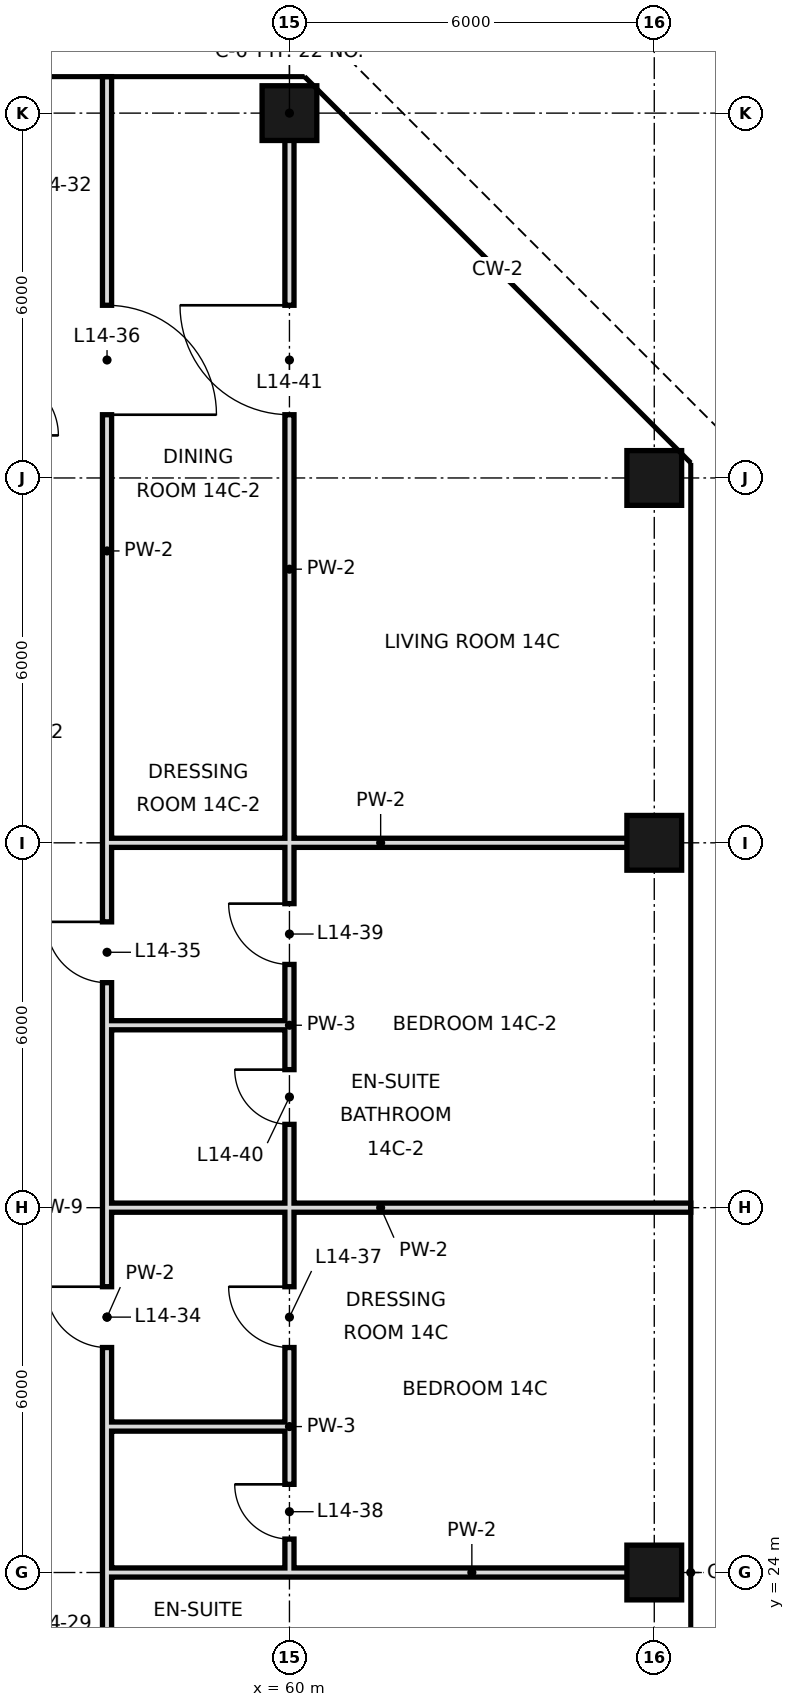
"""IFC4 building model, lengths in metres.
Left out: names, types, materials, properties, quantities, classifications, styles, units other than length and angle.
Written with IfcOpenShell. Run it as: python <this file> out.ifc"""

import sys

from ifc_helpers import new_model, si_unit, direction, frame, frame_2d, origin, origin_2d, place, context, subcontext, project, spatial, rectangle, hollow_rectangle, extrude, element, fill, save


model = new_model("IFC4")
c1 = context("Model", 3, precision=1e-05, world=origin(), true_north=direction((0.0, 1.0)))
c2 = subcontext(c1, "Body", "Model", "MODEL_VIEW")
j1 = project(units=[si_unit("LENGTHUNIT", "METRE"), si_unit("PLANEANGLEUNIT", "RADIAN")], contexts=[c1])
p1 = place(None, origin())
s1 = spatial("IfcSite", under=j1, at=p1, CompositionType="ELEMENT")
p2 = place(p1, origin())
s2 = spatial("IfcBuilding", under=s1, at=p2, CompositionType="ELEMENT")
p3 = place(p2, frame((0.0, 0.0, 71.4)))
s3 = spatial("IfcBuildingStorey", under=s2, at=p3, CompositionType="ELEMENT", Elevation=71.4)
for number, where, z_axis, x_axis in (
    (1, (60.0, 48.0, 0.0), (0.0, 0.0, 1.0), (1.0, 0.0, 0.0)),
    (2, (66.0, 24.0, 0.0), (0.0, 0.0, 1.0), (1.0, 0.0, 0.0)),
    (3, (66.0, 36.0, 0.0), (0.0, 0.0, 1.0), (1.0, 0.0, 0.0)),
    (4, (66.0, 42.0, 0.0), (0.0, 0.0, 1.0), (1.0, 0.0, 0.0)),
):
    element("IfcColumn", number, at=place(p3, frame(where, z_axis=z_axis, x_axis=x_axis)), inside=s3, PredefinedType="COLUMN", context=c2, shape_type="SweptSolid", body=[
        extrude(hollow_rectangle(XDim=0.9, YDim=0.9, WallThickness=0.045, at=origin_2d()), origin(), (0.0, 0.0, 1.0), 3.6),
    ])
p4 = place(p3, frame((57.0, 18.0, 0.0), z_axis=(0.0, 0.0, 1.0), x_axis=(0.0, 1.0, 0.0)))
e5 = element("IfcWall", 5, at=p4, inside=s3, PredefinedType="PARTITIONING", context=c2, shape_type="SweptSolid", body=[
    extrude(rectangle(XDim=6.0, YDim=0.15, at=frame_2d((3.0, 0.0))), origin(), (0.0, 0.0, 1.0), 3.42),
])
p5 = place(p4, frame((2.1, 0.0, 0.0)))
e6 = element("IfcOpeningElement", 6, at=p5, cuts=e5, PredefinedType="OPENING", context=c2, shape_type="SweptSolid", body=[
    extrude(rectangle(XDim=1.8, YDim=2.4, at=frame_2d((0.9, 1.2))), frame((0.0, 0.085, 0.0), z_axis=(0.0, -1.0, 0.0), x_axis=(1.0, 0.0, 0.0)), (0.0, 0.0, 1.0), 0.17),
])
p6 = place(p3, frame((57.0, 26.4, 0.0), z_axis=(0.0, 0.0, 1.0), x_axis=(0.0, 1.0, 0.0)))
e7 = element("IfcWall", 7, at=p6, inside=s3, PredefinedType="PARTITIONING", context=c2, shape_type="SweptSolid", body=[
    extrude(rectangle(XDim=3.6, YDim=0.15, at=frame_2d((1.8, 0.0))), origin(), (0.0, 0.0, 1.0), 3.42),
])
p7 = place(p6, frame((1.3, 0.0, 0.0)))
e8 = element("IfcOpeningElement", 8, at=p7, cuts=e7, PredefinedType="OPENING", context=c2, shape_type="SweptSolid", body=[
    extrude(rectangle(XDim=1.0, YDim=2.4, at=frame_2d((0.5, 1.2))), frame((0.0, 0.085, 0.0), z_axis=(0.0, -1.0, 0.0), x_axis=(1.0, 0.0, 0.0)), (0.0, 0.0, 1.0), 0.17),
])
p8 = place(p3, frame((57.0, 33.0, 0.0), z_axis=(0.0, 0.0, 1.0), x_axis=(0.0, 1.0, 0.0)))
e9 = element("IfcWall", 9, at=p8, inside=s3, PredefinedType="PARTITIONING", context=c2, shape_type="SweptSolid", body=[
    extrude(rectangle(XDim=15.6, YDim=0.15, at=frame_2d((7.8, 0.0))), origin(), (0.0, 0.0, 1.0), 3.42),
])
p9 = place(p8, frame((0.7, 0.0, 0.0)))
e10 = element("IfcOpeningElement", 10, at=p9, cuts=e9, PredefinedType="OPENING", context=c2, shape_type="SweptSolid", body=[
    extrude(rectangle(XDim=1.0, YDim=2.4, at=frame_2d((0.5, 1.2))), frame((0.0, 0.085, 0.0), z_axis=(0.0, -1.0, 0.0), x_axis=(1.0, 0.0, 0.0)), (0.0, 0.0, 1.0), 0.17),
])
p10 = place(p8, frame((10.04, 0.0, 0.0)))
e11 = element("IfcOpeningElement", 11, at=p10, cuts=e9, PredefinedType="OPENING", context=c2, shape_type="SweptSolid", body=[
    extrude(rectangle(XDim=1.8, YDim=2.4, at=frame_2d((0.9, 1.2))), frame((0.0, 0.085, 0.0), z_axis=(0.0, -1.0, 0.0), x_axis=(1.0, 0.0, 0.0)), (0.0, 0.0, 1.0), 0.17),
])
p11 = place(p3, frame((57.0, 24.0, 0.0), z_axis=(0.0, 0.0, 1.0), x_axis=(0.0, 1.0, 0.0)))
e12 = element("IfcWall", 12, at=p11, inside=s3, PredefinedType="PARTITIONING", context=c2, shape_type="SweptSolid", body=[
    extrude(rectangle(XDim=2.4, YDim=0.15, at=frame_2d((1.2, 0.0))), origin(), (0.0, 0.0, 1.0), 3.42),
])
p12 = place(p3, frame((57.0, 30.0, 0.0), z_axis=(0.0, 0.0, 1.0), x_axis=(0.0, 1.0, 0.0)))
e13 = element("IfcWall", 13, at=p12, inside=s3, PredefinedType="PARTITIONING", context=c2, shape_type="SweptSolid", body=[
    extrude(rectangle(XDim=3.0, YDim=0.15, at=frame_2d((1.5, 0.0))), origin(), (0.0, 0.0, 1.0), 3.42),
])
p13 = place(p3, frame((60.0, 26.4, 0.0), z_axis=(0.0, 0.0, 1.0), x_axis=(0.0, 1.0, 0.0)))
e14 = element("IfcWall", 14, at=p13, inside=s3, PredefinedType="PARTITIONING", context=c2, shape_type="SweptSolid", body=[
    extrude(rectangle(XDim=3.6, YDim=0.15, at=frame_2d((1.8, 0.0))), origin(), (0.0, 0.0, 1.0), 3.42),
])
p14 = place(p13, frame((1.3, 0.0, 0.0)))
e15 = element("IfcOpeningElement", 15, at=p14, cuts=e14, PredefinedType="OPENING", context=c2, shape_type="SweptSolid", body=[
    extrude(rectangle(XDim=1.0, YDim=2.4, at=frame_2d((0.5, 1.2))), frame((0.0, 0.085, 0.0), z_axis=(0.0, -1.0, 0.0), x_axis=(1.0, 0.0, 0.0)), (0.0, 0.0, 1.0), 0.17),
])
p15 = place(p3, frame((60.0, 33.0, 0.0), z_axis=(0.0, 0.0, 1.0), x_axis=(0.0, 1.0, 0.0)))
e16 = element("IfcWall", 16, at=p15, inside=s3, PredefinedType="PARTITIONING", context=c2, shape_type="SweptSolid", body=[
    extrude(rectangle(XDim=15.0, YDim=0.15, at=frame_2d((7.5, 0.0))), origin(), (0.0, 0.0, 1.0), 3.42),
])
p16 = place(p15, frame((1.0, 0.0, 0.0)))
e17 = element("IfcOpeningElement", 17, at=p16, cuts=e16, PredefinedType="OPENING", context=c2, shape_type="SweptSolid", body=[
    extrude(rectangle(XDim=1.0, YDim=2.4, at=frame_2d((0.5, 1.2))), frame((0.0, 0.085, 0.0), z_axis=(0.0, -1.0, 0.0), x_axis=(1.0, 0.0, 0.0)), (0.0, 0.0, 1.0), 0.17),
])
p17 = place(p15, frame((10.04, 0.0, 0.0)))
e18 = element("IfcOpeningElement", 18, at=p17, cuts=e16, PredefinedType="OPENING", context=c2, shape_type="SweptSolid", body=[
    extrude(rectangle(XDim=1.8, YDim=2.4, at=frame_2d((0.9, 1.2))), frame((0.0, 0.085, 0.0), z_axis=(0.0, -1.0, 0.0), x_axis=(1.0, 0.0, 0.0)), (0.0, 0.0, 1.0), 0.17),
])
p18 = place(p3, frame((60.0, 24.0, 0.0), z_axis=(0.0, 0.0, 1.0), x_axis=(0.0, 1.0, 0.0)))
e19 = element("IfcWall", 19, at=p18, inside=s3, PredefinedType="PARTITIONING", context=c2, shape_type="SweptSolid", body=[
    extrude(rectangle(XDim=2.4, YDim=0.15, at=frame_2d((1.2, 0.0))), origin(), (0.0, 0.0, 1.0), 3.42),
])
p19 = place(p18, frame((0.55, 0.0, 0.0)))
e20 = element("IfcOpeningElement", 20, at=p19, cuts=e19, PredefinedType="OPENING", context=c2, shape_type="SweptSolid", body=[
    extrude(rectangle(XDim=0.9, YDim=2.4, at=frame_2d((0.45, 1.2))), frame((0.0, 0.085, 0.0), z_axis=(0.0, -1.0, 0.0), x_axis=(1.0, 0.0, 0.0)), (0.0, 0.0, 1.0), 0.17),
])
p20 = place(p3, frame((60.0, 30.0, 0.0), z_axis=(0.0, 0.0, 1.0), x_axis=(0.0, 1.0, 0.0)))
e21 = element("IfcWall", 21, at=p20, inside=s3, PredefinedType="PARTITIONING", context=c2, shape_type="SweptSolid", body=[
    extrude(rectangle(XDim=3.0, YDim=0.15, at=frame_2d((1.5, 0.0))), origin(), (0.0, 0.0, 1.0), 3.42),
])
p21 = place(p20, frame((1.37, 0.0, 0.0)))
e22 = element("IfcOpeningElement", 22, at=p21, cuts=e21, PredefinedType="OPENING", context=c2, shape_type="SweptSolid", body=[
    extrude(rectangle(XDim=0.9, YDim=2.4, at=frame_2d((0.45, 1.2))), frame((0.0, 0.085, 0.0), z_axis=(0.0, -1.0, 0.0), x_axis=(1.0, 0.0, 0.0)), (0.0, 0.0, 1.0), 0.17),
])
p22 = place(p3, frame((60.0, 24.0, 0.0), z_axis=(0.0, 0.0, 1.0), x_axis=(1.0, 0.0, 0.0)))
e23 = element("IfcWall", 23, at=p22, inside=s3, PredefinedType="PARTITIONING", context=c2, shape_type="SweptSolid", body=[
    extrude(rectangle(XDim=6.0, YDim=0.15, at=frame_2d((3.0, 0.0))), origin(), (0.0, 0.0, 1.0), 2.52),
])
p23 = place(p3, frame((57.0, 24.0, 0.0), z_axis=(0.0, 0.0, 1.0), x_axis=(1.0, 0.0, 0.0)))
e24 = element("IfcWall", 24, at=p23, inside=s3, PredefinedType="PARTITIONING", context=c2, shape_type="SweptSolid", body=[
    extrude(rectangle(XDim=3.0, YDim=0.15, at=frame_2d((1.5, 0.0))), origin(), (0.0, 0.0, 1.0), 2.52),
])
p24 = place(p3, frame((57.0, 26.4, 0.0), z_axis=(0.0, 0.0, 1.0), x_axis=(1.0, 0.0, 0.0)))
e25 = element("IfcWall", 25, at=p24, inside=s3, PredefinedType="PARTITIONING", context=c2, shape_type="SweptSolid", body=[
    extrude(rectangle(XDim=3.0, YDim=0.15, at=frame_2d((1.5, 0.0))), origin(), (0.0, 0.0, 1.0), 3.42),
])
p25 = place(p3, frame((60.0, 30.0, 0.0), z_axis=(0.0, 0.0, 1.0), x_axis=(1.0, 0.0, 0.0)))
e26 = element("IfcWall", 26, at=p25, inside=s3, PredefinedType="PARTITIONING", context=c2, shape_type="SweptSolid", body=[
    extrude(rectangle(XDim=6.6, YDim=0.15, at=frame_2d((3.3, 0.0))), origin(), (0.0, 0.0, 1.0), 2.52),
])
p26 = place(p3, frame((57.0, 30.0, 0.0), z_axis=(0.0, 0.0, 1.0), x_axis=(1.0, 0.0, 0.0)))
e27 = element("IfcWall", 27, at=p26, inside=s3, PredefinedType="PARTITIONING", context=c2, shape_type="SweptSolid", body=[
    extrude(rectangle(XDim=3.0, YDim=0.15, at=frame_2d((1.5, 0.0))), origin(), (0.0, 0.0, 1.0), 2.52),
])
p27 = place(p3, frame((57.0, 33.0, 0.0), z_axis=(0.0, 0.0, 1.0), x_axis=(1.0, 0.0, 0.0)))
e28 = element("IfcWall", 28, at=p27, inside=s3, PredefinedType="PARTITIONING", context=c2, shape_type="SweptSolid", body=[
    extrude(rectangle(XDim=3.0, YDim=0.15, at=frame_2d((1.5, 0.0))), origin(), (0.0, 0.0, 1.0), 3.42),
])
p28 = place(p3, frame((57.0, 36.0, 0.0), z_axis=(0.0, 0.0, 1.0), x_axis=(1.0, 0.0, 0.0)))
e29 = element("IfcWall", 29, at=p28, inside=s3, PredefinedType="PARTITIONING", context=c2, shape_type="SweptSolid", body=[
    extrude(rectangle(XDim=9.0, YDim=0.15, at=frame_2d((4.5, 0.0))), origin(), (0.0, 0.0, 1.0), 2.52),
])
p29 = place(p7, frame((1.0, 0.0, 0.0), z_axis=(0.0, 0.0, 1.0), x_axis=(-1.0, 0.0, 0.0)))
e30 = element("IfcDoor", 30, at=p29, inside=s3, OperationType="SINGLE_SWING_LEFT", PredefinedType="DOOR", context=c2, shape_type="SweptSolid", body=[
    extrude(rectangle(XDim=1.0, YDim=2.4, at=frame_2d((0.5, 1.2))), frame((0.0, 0.025, 0.0), z_axis=(0.0, -1.0, 0.0), x_axis=(1.0, 0.0, 0.0)), (0.0, 0.0, 1.0), 0.05),
])
fill(e8, e30)
p30 = place(p9, frame((1.0, 0.0, 0.0), z_axis=(0.0, 0.0, 1.0), x_axis=(-1.0, 0.0, 0.0)))
e31 = element("IfcDoor", 31, at=p30, inside=s3, OperationType="SINGLE_SWING_LEFT", PredefinedType="DOOR", context=c2, shape_type="SweptSolid", body=[
    extrude(rectangle(XDim=1.0, YDim=2.4, at=frame_2d((0.5, 1.2))), frame((0.0, 0.025, 0.0), z_axis=(0.0, -1.0, 0.0), x_axis=(1.0, 0.0, 0.0)), (0.0, 0.0, 1.0), 0.05),
])
fill(e10, e31)
p31 = place(p10, frame((1.8, 0.0, 0.0), z_axis=(0.0, 0.0, 1.0), x_axis=(-1.0, 0.0, 0.0)))
e32 = element("IfcDoor", 32, at=p31, inside=s3, OperationType="SINGLE_SWING_RIGHT", PredefinedType="DOOR", context=c2, shape_type="SweptSolid", body=[
    extrude(rectangle(XDim=1.8, YDim=2.4, at=frame_2d((0.9, 1.2))), frame((0.0, 0.025, 0.0), z_axis=(0.0, -1.0, 0.0), x_axis=(1.0, 0.0, 0.0)), (0.0, 0.0, 1.0), 0.05),
])
fill(e11, e32)
p32 = place(p14, frame((1.0, 0.0, 0.0), z_axis=(0.0, 0.0, 1.0), x_axis=(-1.0, 0.0, 0.0)))
e33 = element("IfcDoor", 33, at=p32, inside=s3, OperationType="SINGLE_SWING_LEFT", PredefinedType="DOOR", context=c2, shape_type="SweptSolid", body=[
    extrude(rectangle(XDim=1.0, YDim=2.4, at=frame_2d((0.5, 1.2))), frame((0.0, 0.025, 0.0), z_axis=(0.0, -1.0, 0.0), x_axis=(1.0, 0.0, 0.0)), (0.0, 0.0, 1.0), 0.05),
])
fill(e15, e33)
p33 = place(p19, frame((0.9, 0.0, 0.0), z_axis=(0.0, 0.0, 1.0), x_axis=(-1.0, 0.0, 0.0)))
e34 = element("IfcDoor", 34, at=p33, inside=s3, OperationType="SINGLE_SWING_LEFT", PredefinedType="DOOR", context=c2, shape_type="SweptSolid", body=[
    extrude(rectangle(XDim=0.9, YDim=2.4, at=frame_2d((0.45, 1.2))), frame((0.0, 0.025, 0.0), z_axis=(0.0, -1.0, 0.0), x_axis=(1.0, 0.0, 0.0)), (0.0, 0.0, 1.0), 0.05),
])
fill(e20, e34)
p34 = place(p16, frame((1.0, 0.0, 0.0), z_axis=(0.0, 0.0, 1.0), x_axis=(-1.0, 0.0, 0.0)))
e35 = element("IfcDoor", 35, at=p34, inside=s3, OperationType="SINGLE_SWING_LEFT", PredefinedType="DOOR", context=c2, shape_type="SweptSolid", body=[
    extrude(rectangle(XDim=1.0, YDim=2.4, at=frame_2d((0.5, 1.2))), frame((0.0, 0.025, 0.0), z_axis=(0.0, -1.0, 0.0), x_axis=(1.0, 0.0, 0.0)), (0.0, 0.0, 1.0), 0.05),
])
fill(e17, e35)
p35 = place(p21, frame((0.9, 0.0, 0.0), z_axis=(0.0, 0.0, 1.0), x_axis=(-1.0, 0.0, 0.0)))
e36 = element("IfcDoor", 36, at=p35, inside=s3, OperationType="SINGLE_SWING_LEFT", PredefinedType="DOOR", context=c2, shape_type="SweptSolid", body=[
    extrude(rectangle(XDim=0.9, YDim=2.4, at=frame_2d((0.45, 1.2))), frame((0.0, 0.025, 0.0), z_axis=(0.0, -1.0, 0.0), x_axis=(1.0, 0.0, 0.0)), (0.0, 0.0, 1.0), 0.05),
])
fill(e22, e36)
p36 = place(p17, frame((1.8, 0.0, 0.0), z_axis=(0.0, 0.0, 1.0), x_axis=(-1.0, 0.0, 0.0)))
e37 = element("IfcDoor", 37, at=p36, inside=s3, OperationType="SINGLE_SWING_LEFT", PredefinedType="DOOR", context=c2, shape_type="SweptSolid", body=[
    extrude(rectangle(XDim=1.8, YDim=2.4, at=frame_2d((0.9, 1.2))), frame((0.0, 0.025, 0.0), z_axis=(0.0, -1.0, 0.0), x_axis=(1.0, 0.0, 0.0)), (0.0, 0.0, 1.0), 0.05),
])
fill(e18, e37)
save(model, sys.argv[1])
